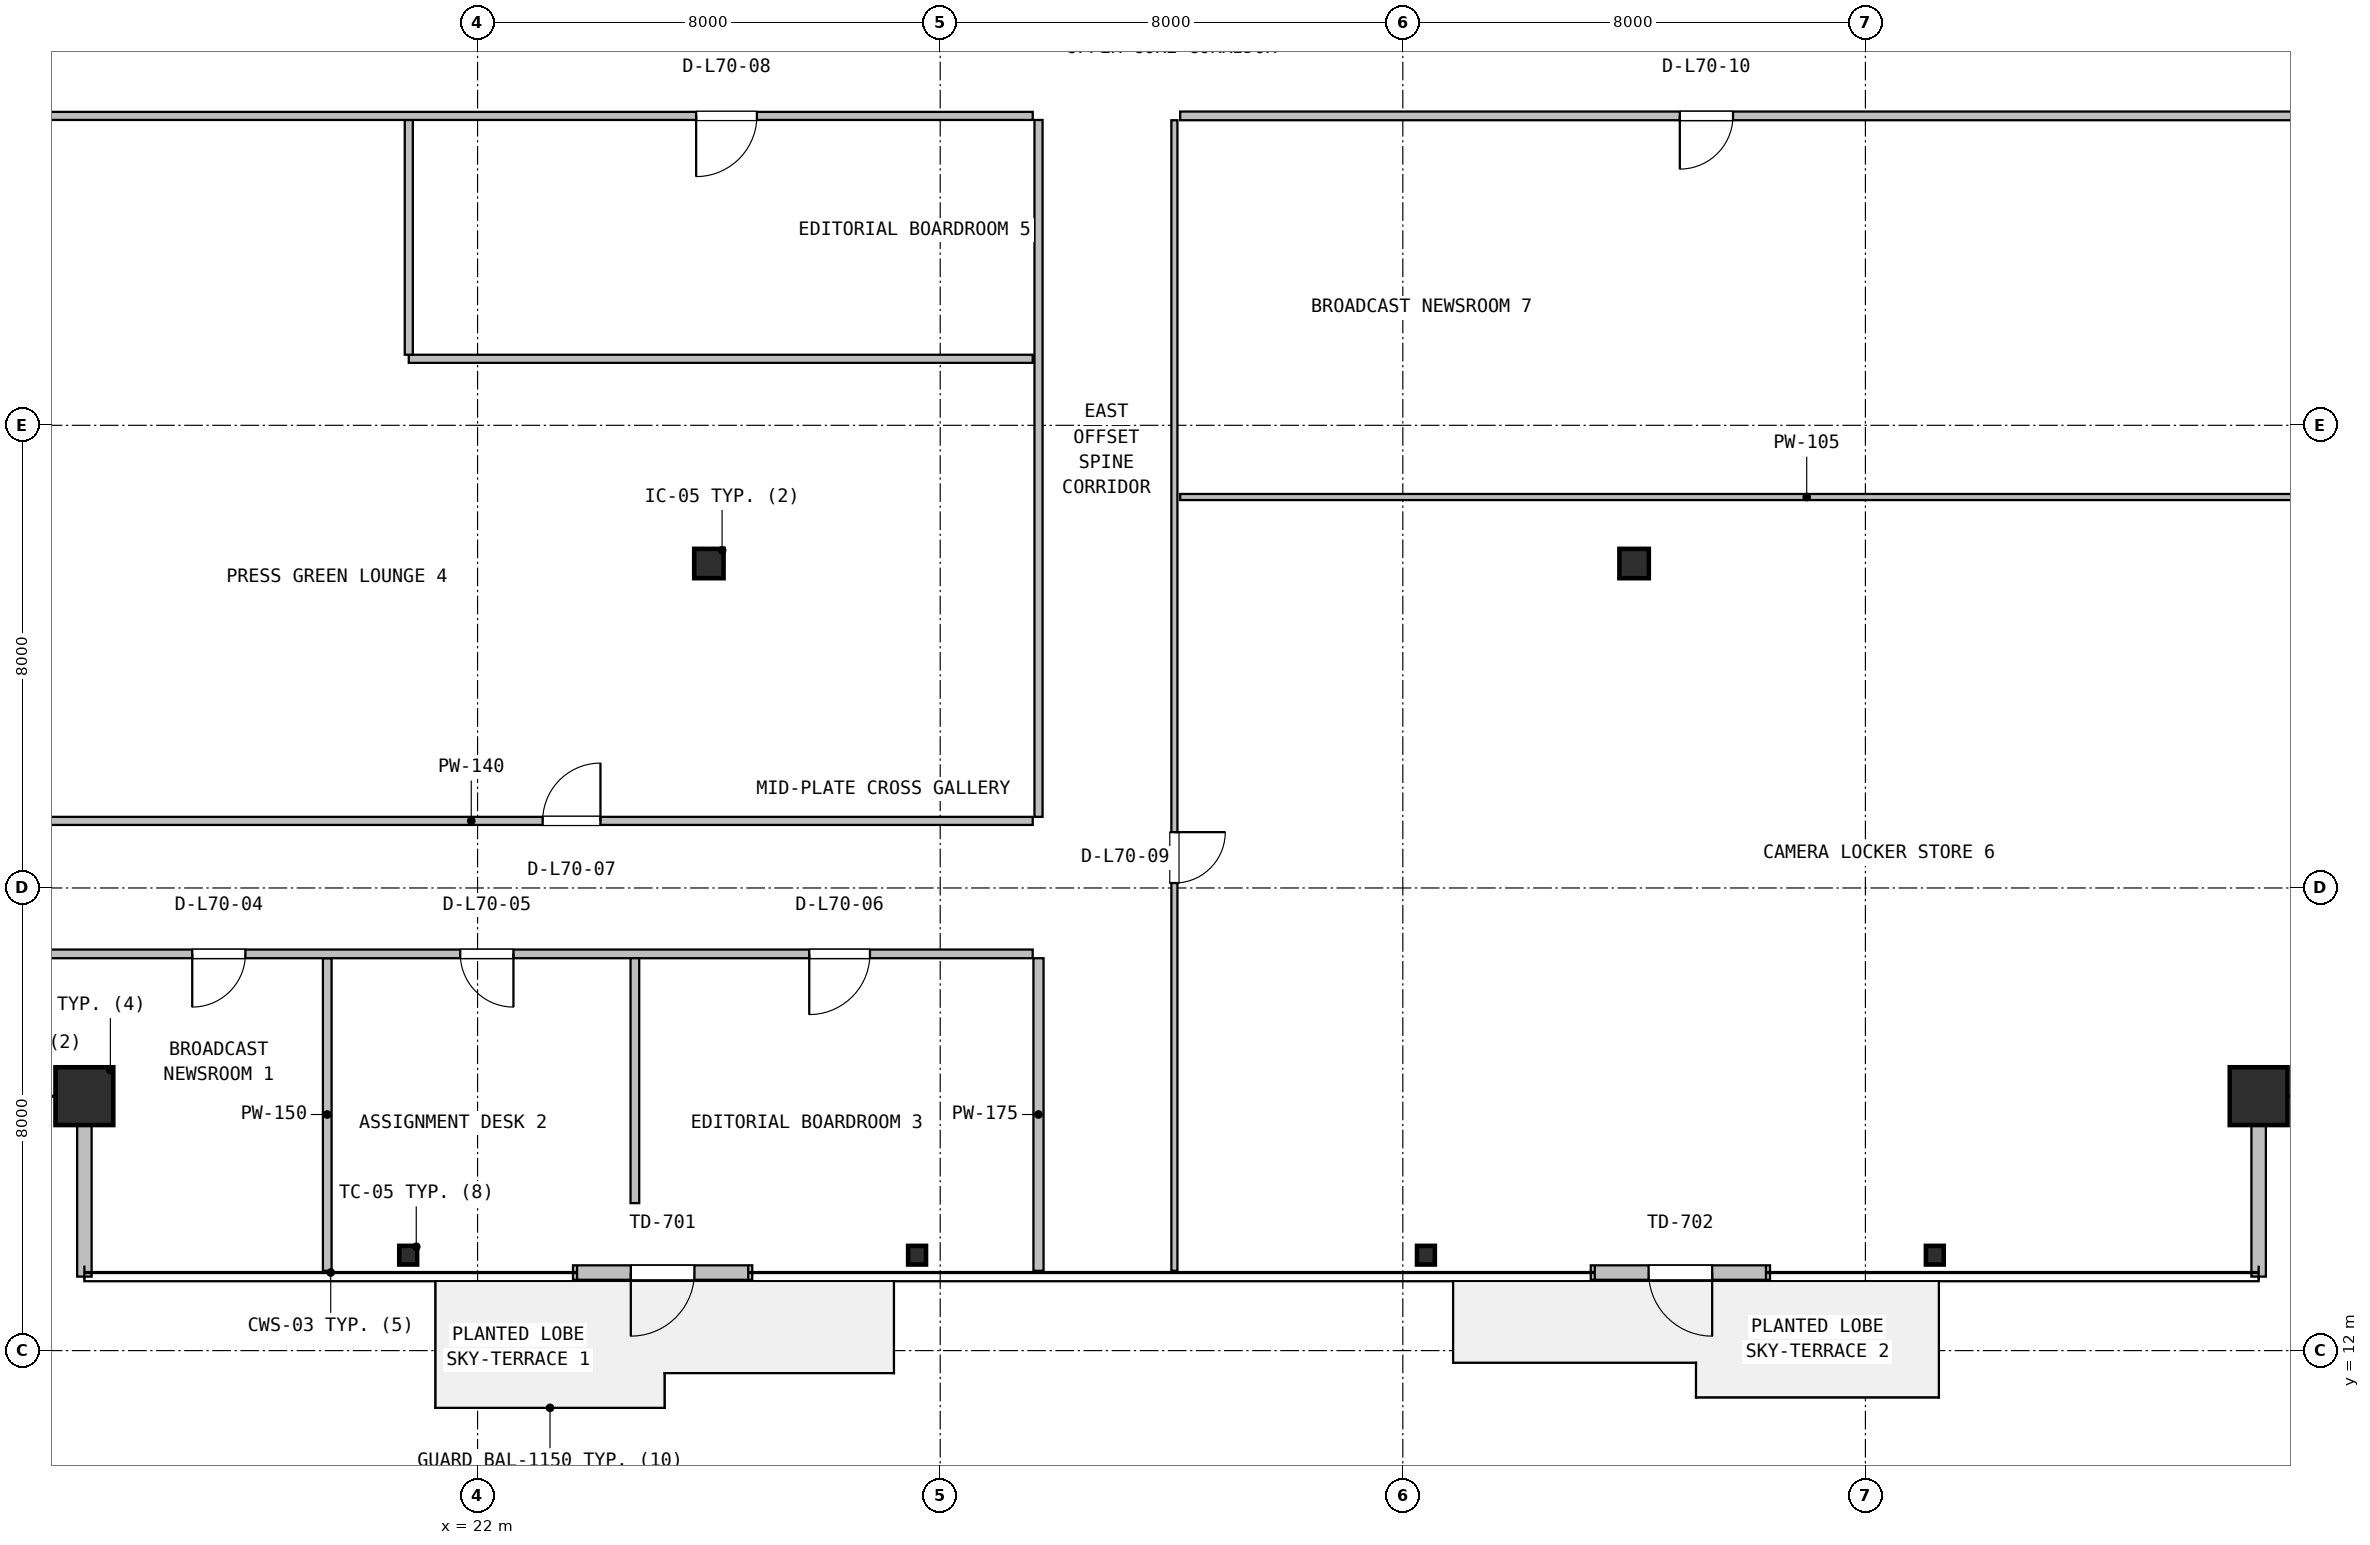
"""IFC4 building model, lengths in metres.
Left out: names, types, materials, properties, quantities, classifications, styles, units other than length and angle.
Written with IfcOpenShell. Run it as: python <this file> out.ifc"""

import sys

from ifc_helpers import new_model, si_unit, direction, frame, frame_2d, origin, origin_2d, place, context, subcontext, project, spatial, rectangle, hollow_rectangle, hollow_circle, i_section, extrude, source, transform, mapped, element, fill, save


model = new_model("IFC4")
c1 = context("Model", 3, precision=1e-05, world=origin(), true_north=direction((0.0, 1.0)))
c2 = subcontext(c1, "Body", "Model", "MODEL_VIEW")
j1 = project(units=[si_unit("LENGTHUNIT", "METRE"), si_unit("PLANEANGLEUNIT", "RADIAN")], contexts=[c1])
p1 = place(None, origin())
s1 = spatial("IfcSite", under=j1, at=p1, CompositionType="ELEMENT")
p2 = place(p1, origin())
s2 = spatial("IfcBuilding", under=s1, at=p2, CompositionType="ELEMENT")
p3 = place(p2, frame((0.0, 0.0, 281.2)))
s3 = spatial("IfcBuildingStorey", under=s2, at=p3, CompositionType="ELEMENT", Elevation=281.2)
m1 = source(origin(), c2, "Body", "SweptSolid", [
    extrude(hollow_rectangle(XDim=1.0, YDim=1.0, WallThickness=0.04, at=origin_2d()), origin(), (0.0, 0.0, 1.0), 3.8),
])
for number, where, z_axis, x_axis in (
    (1, (15.2, 16.4, 0.0), (0.0, 0.0, 1.0), (1.0, 0.0, 0.0)),
    (2, (52.8, 16.4, 0.0), (0.0, 0.0, 1.0), (1.0, 0.0, 0.0)),
):
    element("IfcColumn", number, at=place(p3, frame(where, z_axis=z_axis, x_axis=x_axis)), inside=s3, PredefinedType="COLUMN", context=c2, shape_type="MappedRepresentation", body=[
        mapped(m1, transform((0.0, 0.0, 0.0), x_axis=(1.0, 0.0, 0.0), y_axis=(0.0, 1.0, 0.0), z_axis=(0.0, 0.0, 1.0), scale=1.0)),
    ])
m2 = source(origin(), c2, "Body", "SweptSolid", [
    extrude(i_section(OverallWidth=0.309, OverallDepth=0.323, WebThickness=0.014, FlangeThickness=0.023, FilletRadius=0.015, at=origin_2d()), origin(), (0.0, 0.0, 1.0), 3.8),
])
for number, where, z_axis, x_axis in (
    (3, (20.8, 13.65, 0.0), (0.0, 0.0, 1.0), (1.0, 0.0, 0.0)),
    (4, (29.6, 13.65, 0.0), (0.0, 0.0, 1.0), (1.0, 0.0, 0.0)),
    (5, (38.4, 13.65, 0.0), (0.0, 0.0, 1.0), (1.0, 0.0, 0.0)),
    (6, (47.2, 13.65, 0.0), (0.0, 0.0, 1.0), (1.0, 0.0, 0.0)),
):
    element("IfcColumn", number, at=place(p3, frame(where, z_axis=z_axis, x_axis=x_axis)), inside=s3, PredefinedType="COLUMN", context=c2, shape_type="MappedRepresentation", body=[
        mapped(m2, transform((0.0, 0.0, 0.0), x_axis=(1.0, 0.0, 0.0), y_axis=(0.0, 1.0, 0.0), z_axis=(0.0, 0.0, 1.0), scale=1.0)),
    ])
m3 = source(origin(), c2, "Body", "SweptSolid", [
    extrude(hollow_circle(Radius=0.254, WallThickness=0.02, at=origin_2d()), origin(), (0.0, 0.0, 1.0), 3.8),
])
for number, where, z_axis, x_axis in (
    (7, (26.0, 25.61, 0.0), (0.0, 0.0, 1.0), (1.0, 0.0, 0.0)),
    (8, (42.0, 25.61, 0.0), (0.0, 0.0, 1.0), (1.0, 0.0, 0.0)),
):
    element("IfcColumn", number, at=place(p3, frame(where, z_axis=z_axis, x_axis=x_axis)), inside=s3, PredefinedType="COLUMN", context=c2, shape_type="MappedRepresentation", body=[
        mapped(m3, transform((0.0, 0.0, 0.0), x_axis=(1.0, 0.0, 0.0), y_axis=(0.0, 1.0, 0.0), z_axis=(0.0, 0.0, 1.0), scale=1.0)),
    ])
p4 = place(p3, frame((23.65, 13.35, 0.0), z_axis=(0.0, 0.0, 1.0), x_axis=(1.0, 0.0, 0.0)))
e9 = element("IfcWall", 9, at=p4, inside=s3, PredefinedType="SOLIDWALL", context=c2, shape_type="SweptSolid", body=[
    extrude(rectangle(XDim=3.1, YDim=0.25, at=frame_2d((1.55, 0.0))), origin(), (0.0, 0.0, 1.0), 3.53),
])
p5 = place(p4, frame((1.0, 0.0, 0.0)))
e10 = element("IfcOpeningElement", 10, at=p5, cuts=e9, PredefinedType="OPENING", context=c2, shape_type="SweptSolid", body=[
    extrude(rectangle(XDim=1.1, YDim=2.15, at=frame_2d((0.55, 1.075))), frame((0.0, 0.135, 0.0), z_axis=(0.0, -1.0, 0.0), x_axis=(1.0, 0.0, 0.0)), (0.0, 0.0, 1.0), 0.27),
])
p6 = place(p3, frame((41.25, 13.35, 0.0), z_axis=(0.0, 0.0, 1.0), x_axis=(1.0, 0.0, 0.0)))
e11 = element("IfcWall", 11, at=p6, inside=s3, PredefinedType="SOLIDWALL", context=c2, shape_type="SweptSolid", body=[
    extrude(rectangle(XDim=3.1, YDim=0.25, at=frame_2d((1.55, 0.0))), origin(), (0.0, 0.0, 1.0), 3.53),
])
p7 = place(p6, frame((1.0, 0.0, 0.0)))
e12 = element("IfcOpeningElement", 12, at=p7, cuts=e11, PredefinedType="OPENING", context=c2, shape_type="SweptSolid", body=[
    extrude(rectangle(XDim=1.1, YDim=2.15, at=frame_2d((0.55, 1.075))), frame((0.0, 0.135, 0.0), z_axis=(0.0, -1.0, 0.0), x_axis=(1.0, 0.0, 0.0)), (0.0, 0.0, 1.0), 0.27),
])
for number, where, z_axis, x_axis in (
    (13, (15.2, 13.28, 0.0), (0.0, 0.0, 1.0), (0.0, 1.0, 0.0)),
    (14, (52.8, 13.28, 0.0), (0.0, 0.0, 1.0), (0.0, 1.0, 0.0)),
):
    element("IfcWall", number, at=place(p3, frame(where, z_axis=z_axis, x_axis=x_axis)), inside=s3, PredefinedType="SOLIDWALL", context=c2, shape_type="SweptSolid", body=[
        extrude(rectangle(XDim=3.2, YDim=0.25, at=frame_2d((1.6, 0.0))), origin(), (0.0, 0.0, 1.0), 3.171),
    ])
p8 = place(p3, frame((19.4, 13.38, 0.0), z_axis=(0.0, 0.0, 1.0), x_axis=(0.0, 1.0, 0.0)))
e15 = element("IfcWall", 15, at=p8, inside=s3, PredefinedType="PARTITIONING", context=c2, shape_type="SweptSolid", body=[
    extrude(rectangle(XDim=5.405, YDim=0.15, at=frame_2d((2.703, 0.0))), origin(), (0.0, 0.0, 1.0), 3.171),
])
p9 = place(p3, frame((12.18, 18.86, 0.0), z_axis=(0.0, 0.0, 1.0), x_axis=(1.0, 0.0, 0.0)))
e16 = element("IfcWall", 16, at=p9, inside=s3, PredefinedType="PARTITIONING", context=c2, shape_type="SweptSolid", body=[
    extrude(rectangle(XDim=19.42, YDim=0.15, at=frame_2d((9.71, 0.0))), origin(), (0.0, 0.0, 1.0), 2.981),
])
p10 = place(p9, frame((4.885, 0.0, 0.0)))
e17 = element("IfcOpeningElement", 17, at=p10, cuts=e16, PredefinedType="OPENING", context=c2, shape_type="SweptSolid", body=[
    extrude(rectangle(XDim=0.92, YDim=2.08, at=frame_2d((0.46, 1.04))), frame((0.0, 0.085, 0.0), z_axis=(0.0, -1.0, 0.0), x_axis=(1.0, 0.0, 0.0)), (0.0, 0.0, 1.0), 0.17),
])
p11 = place(p9, frame((9.52, 0.0, 0.0)))
e18 = element("IfcOpeningElement", 18, at=p11, cuts=e16, PredefinedType="OPENING", context=c2, shape_type="SweptSolid", body=[
    extrude(rectangle(XDim=0.92, YDim=2.08, at=frame_2d((0.46, 1.04))), frame((0.0, 0.085, 0.0), z_axis=(0.0, -1.0, 0.0), x_axis=(1.0, 0.0, 0.0)), (0.0, 0.0, 1.0), 0.17),
])
p12 = place(p9, frame((15.555, 0.0, 0.0)))
e19 = element("IfcOpeningElement", 19, at=p12, cuts=e16, PredefinedType="OPENING", context=c2, shape_type="SweptSolid", body=[
    extrude(rectangle(XDim=1.05, YDim=2.1, at=frame_2d((0.525, 1.05))), frame((0.0, 0.085, 0.0), z_axis=(0.0, -1.0, 0.0), x_axis=(1.0, 0.0, 0.0)), (0.0, 0.0, 1.0), 0.17),
])
p13 = place(p3, frame((24.72, 14.55, 0.0), z_axis=(0.0, 0.0, 1.0), x_axis=(0.0, 1.0, 0.0)))
e20 = element("IfcWall", 20, at=p13, inside=s3, PredefinedType="PARTITIONING", context=c2, shape_type="SweptSolid", body=[
    extrude(rectangle(XDim=4.235, YDim=0.15, at=frame_2d((2.117, 0.0))), origin(), (0.0, 0.0, 1.0), 3.278),
])
p14 = place(p3, frame((31.7, 13.38, 0.0), z_axis=(0.0, 0.0, 1.0), x_axis=(0.0, 1.0, 0.0)))
e21 = element("IfcWall", 21, at=p14, inside=s3, PredefinedType="PARTITIONING", context=c2, shape_type="SweptSolid", body=[
    extrude(rectangle(XDim=5.405, YDim=0.175, at=frame_2d((2.703, 0.0))), origin(), (0.0, 0.0, 1.0), 3.171),
])
p15 = place(p3, frame((12.18, 21.16, 0.0), z_axis=(0.0, 0.0, 1.0), x_axis=(1.0, 0.0, 0.0)))
e22 = element("IfcWall", 22, at=p15, inside=s3, PredefinedType="PARTITIONING", context=c2, shape_type="SweptSolid", body=[
    extrude(rectangle(XDim=19.42, YDim=0.14, at=frame_2d((9.71, 0.0))), origin(), (0.0, 0.0, 1.0), 2.981),
])
p16 = place(p15, frame((10.945, 0.0, 0.0)))
e23 = element("IfcOpeningElement", 23, at=p16, cuts=e22, PredefinedType="OPENING", context=c2, shape_type="SweptSolid", body=[
    extrude(rectangle(XDim=1.0, YDim=2.1, at=frame_2d((0.5, 1.05))), frame((0.0, 0.08, 0.0), z_axis=(0.0, -1.0, 0.0), x_axis=(1.0, 0.0, 0.0)), (0.0, 0.0, 1.0), 0.16),
])
p17 = place(p3, frame((31.7, 21.23, 0.0), z_axis=(0.0, 0.0, 1.0), x_axis=(0.0, 1.0, 0.0)))
e24 = element("IfcWall", 24, at=p17, inside=s3, PredefinedType="PARTITIONING", context=c2, shape_type="SweptSolid", body=[
    extrude(rectangle(XDim=12.05, YDim=0.14, at=frame_2d((6.025, 0.0))), origin(), (0.0, 0.0, 1.0), 2.981),
])
p18 = place(p3, frame((20.81, 29.15, 0.0), z_axis=(0.0, 0.0, 1.0), x_axis=(1.0, 0.0, 0.0)))
e25 = element("IfcWall", 25, at=p18, inside=s3, PredefinedType="PARTITIONING", context=c2, shape_type="SweptSolid", body=[
    extrude(rectangle(XDim=10.79, YDim=0.14, at=frame_2d((5.395, 0.0))), origin(), (0.0, 0.0, 1.0), 2.981),
])
p19 = place(p3, frame((20.81, 29.22, 0.0), z_axis=(0.0, 0.0, 1.0), x_axis=(0.0, 1.0, 0.0)))
e26 = element("IfcWall", 26, at=p19, inside=s3, PredefinedType="PARTITIONING", context=c2, shape_type="SweptSolid", body=[
    extrude(rectangle(XDim=4.06, YDim=0.14, at=frame_2d((2.03, 0.0))), origin(), (0.0, 0.0, 1.0), 3.53),
])
p20 = place(p3, frame((12.18, 33.35, 0.0), z_axis=(0.0, 0.0, 1.0), x_axis=(1.0, 0.0, 0.0)))
e27 = element("IfcWall", 27, at=p20, inside=s3, PredefinedType="PARTITIONING", context=c2, shape_type="SweptSolid", body=[
    extrude(rectangle(XDim=19.42, YDim=0.14, at=frame_2d((9.71, 0.0))), origin(), (0.0, 0.0, 1.0), 2.981),
])
p21 = place(p20, frame((13.6, 0.0, 0.0)))
e28 = element("IfcOpeningElement", 28, at=p21, cuts=e27, PredefinedType="OPENING", context=c2, shape_type="SweptSolid", body=[
    extrude(rectangle(XDim=1.05, YDim=2.1, at=frame_2d((0.525, 1.05))), frame((0.0, 0.08, 0.0), z_axis=(0.0, -1.0, 0.0), x_axis=(1.0, 0.0, 0.0)), (0.0, 0.0, 1.0), 0.16),
])
p22 = place(p3, frame((34.15, 26.76, 0.0), z_axis=(0.0, 0.0, 1.0), x_axis=(1.0, 0.0, 0.0)))
e29 = element("IfcWall", 29, at=p22, inside=s3, PredefinedType="PARTITIONING", context=c2, shape_type="SweptSolid", body=[
    extrude(rectangle(XDim=21.67, YDim=0.105, at=frame_2d((10.835, 0.0))), origin(), (0.0, 0.0, 1.0), 2.981),
])
p23 = place(p3, frame((34.05, 13.38, 0.0), z_axis=(0.0, 0.0, 1.0), x_axis=(0.0, 1.0, 0.0)))
e30 = element("IfcWall", 30, at=p23, inside=s3, PredefinedType="PARTITIONING", context=c2, shape_type="SweptSolid", body=[
    extrude(rectangle(XDim=19.895, YDim=0.105, at=frame_2d((9.948, 0.0))), origin(), (0.0, 0.0, 1.0), 2.981),
])
p24 = place(p23, frame((6.705, 0.0, 0.0)))
e31 = element("IfcOpeningElement", 31, at=p24, cuts=e30, PredefinedType="OPENING", context=c2, shape_type="SweptSolid", body=[
    extrude(rectangle(XDim=0.88, YDim=2.06, at=frame_2d((0.44, 1.03))), frame((0.0, 0.062, 0.0), z_axis=(0.0, -1.0, 0.0), x_axis=(1.0, 0.0, 0.0)), (0.0, 0.0, 1.0), 0.125),
])
p25 = place(p3, frame((34.15, 33.35, 0.0), z_axis=(0.0, 0.0, 1.0), x_axis=(1.0, 0.0, 0.0)))
e32 = element("IfcWall", 32, at=p25, inside=s3, PredefinedType="PARTITIONING", context=c2, shape_type="SweptSolid", body=[
    extrude(rectangle(XDim=21.67, YDim=0.15, at=frame_2d((10.835, 0.0))), origin(), (0.0, 0.0, 1.0), 2.981),
])
p26 = place(p25, frame((8.64, 0.0, 0.0)))
e33 = element("IfcOpeningElement", 33, at=p26, cuts=e32, PredefinedType="OPENING", context=c2, shape_type="SweptSolid", body=[
    extrude(rectangle(XDim=0.92, YDim=2.08, at=frame_2d((0.46, 1.04))), frame((0.0, 0.085, 0.0), z_axis=(0.0, -1.0, 0.0), x_axis=(1.0, 0.0, 0.0)), (0.0, 0.0, 1.0), 0.17),
])
m4 = source(origin(), c2, "Body", "SweptSolid", [
    extrude(rectangle(XDim=1.1, YDim=2.15, at=frame_2d((0.55, 1.075))), frame((0.0, 0.025, 0.0), z_axis=(0.0, -1.0, 0.0), x_axis=(1.0, 0.0, 0.0)), (0.0, 0.0, 1.0), 0.05),
])
p27 = place(p5, frame((1.1, 0.0, 0.0), z_axis=(0.0, 0.0, 1.0), x_axis=(-1.0, 0.0, 0.0)))
e34 = element("IfcDoor", 34, at=p27, inside=s3, OperationType="SINGLE_SWING_LEFT", PredefinedType="DOOR", context=c2, shape_type="MappedRepresentation", body=[
    mapped(m4, transform((0.0, 0.0, 0.0), x_axis=(1.0, 0.0, 0.0), y_axis=(0.0, 1.0, 0.0), z_axis=(0.0, 0.0, 1.0), scale=1.0)),
])
fill(e10, e34)
p28 = place(p7, frame((1.1, 0.0, 0.0), z_axis=(0.0, 0.0, 1.0), x_axis=(-1.0, 0.0, 0.0)))
e35 = element("IfcDoor", 35, at=p28, inside=s3, OperationType="SINGLE_SWING_RIGHT", PredefinedType="DOOR", context=c2, shape_type="MappedRepresentation", body=[
    mapped(m4, transform((0.0, 0.0, 0.0), x_axis=(1.0, 0.0, 0.0), y_axis=(0.0, 1.0, 0.0), z_axis=(0.0, 0.0, 1.0), scale=1.0)),
])
fill(e12, e35)
m5 = source(origin(), c2, "Body", "SweptSolid", [
    extrude(rectangle(XDim=0.92, YDim=2.08, at=frame_2d((0.46, 1.04))), frame((0.0, 0.025, 0.0), z_axis=(0.0, -1.0, 0.0), x_axis=(1.0, 0.0, 0.0)), (0.0, 0.0, 1.0), 0.05),
])
p29 = place(p10, frame((0.92, 0.0, 0.0), z_axis=(0.0, 0.0, 1.0), x_axis=(-1.0, 0.0, 0.0)))
e36 = element("IfcDoor", 36, at=p29, inside=s3, OperationType="SINGLE_SWING_LEFT", PredefinedType="DOOR", context=c2, shape_type="MappedRepresentation", body=[
    mapped(m5, transform((0.0, 0.0, 0.0), x_axis=(1.0, 0.0, 0.0), y_axis=(0.0, 1.0, 0.0), z_axis=(0.0, 0.0, 1.0), scale=1.0)),
])
fill(e17, e36)
p30 = place(p11, frame((0.92, 0.0, 0.0), z_axis=(0.0, 0.0, 1.0), x_axis=(-1.0, 0.0, 0.0)))
e37 = element("IfcDoor", 37, at=p30, inside=s3, OperationType="SINGLE_SWING_RIGHT", PredefinedType="DOOR", context=c2, shape_type="MappedRepresentation", body=[
    mapped(m5, transform((0.0, 0.0, 0.0), x_axis=(1.0, 0.0, 0.0), y_axis=(0.0, 1.0, 0.0), z_axis=(0.0, 0.0, 1.0), scale=1.0)),
])
fill(e18, e37)
m6 = source(origin(), c2, "Body", "SweptSolid", [
    extrude(rectangle(XDim=1.05, YDim=2.1, at=frame_2d((0.525, 1.05))), frame((0.0, 0.025, 0.0), z_axis=(0.0, -1.0, 0.0), x_axis=(1.0, 0.0, 0.0)), (0.0, 0.0, 1.0), 0.05),
])
p31 = place(p12, frame((1.05, 0.0, 0.0), z_axis=(0.0, 0.0, 1.0), x_axis=(-1.0, 0.0, 0.0)))
e38 = element("IfcDoor", 38, at=p31, inside=s3, OperationType="SINGLE_SWING_LEFT", PredefinedType="DOOR", context=c2, shape_type="MappedRepresentation", body=[
    mapped(m6, transform((0.0, 0.0, 0.0), x_axis=(1.0, 0.0, 0.0), y_axis=(0.0, 1.0, 0.0), z_axis=(0.0, 0.0, 1.0), scale=1.0)),
])
fill(e19, e38)
m7 = source(origin(), c2, "Body", "SweptSolid", [
    extrude(rectangle(XDim=1.0, YDim=2.1, at=frame_2d((0.5, 1.05))), frame((0.0, 0.025, 0.0), z_axis=(0.0, -1.0, 0.0), x_axis=(1.0, 0.0, 0.0)), (0.0, 0.0, 1.0), 0.05),
])
p32 = place(p16, origin())
e39 = element("IfcDoor", 39, at=p32, inside=s3, OperationType="SINGLE_SWING_RIGHT", PredefinedType="DOOR", context=c2, shape_type="MappedRepresentation", body=[
    mapped(m7, transform((0.0, 0.0, 0.0), x_axis=(1.0, 0.0, 0.0), y_axis=(0.0, 1.0, 0.0), z_axis=(0.0, 0.0, 1.0), scale=1.0)),
])
fill(e23, e39)
p33 = place(p21, frame((1.05, 0.0, 0.0), z_axis=(0.0, 0.0, 1.0), x_axis=(-1.0, 0.0, 0.0)))
e40 = element("IfcDoor", 40, at=p33, inside=s3, OperationType="SINGLE_SWING_LEFT", PredefinedType="DOOR", context=c2, shape_type="MappedRepresentation", body=[
    mapped(m6, transform((0.0, 0.0, 0.0), x_axis=(1.0, 0.0, 0.0), y_axis=(0.0, 1.0, 0.0), z_axis=(0.0, 0.0, 1.0), scale=1.0)),
])
fill(e28, e40)
m8 = source(origin(), c2, "Body", "SweptSolid", [
    extrude(rectangle(XDim=0.88, YDim=2.06, at=frame_2d((0.44, 1.03))), frame((0.0, 0.025, 0.0), z_axis=(0.0, -1.0, 0.0), x_axis=(1.0, 0.0, 0.0)), (0.0, 0.0, 1.0), 0.05),
])
p34 = place(p24, frame((0.88, 0.0, 0.0), z_axis=(0.0, 0.0, 1.0), x_axis=(-1.0, 0.0, 0.0)))
e41 = element("IfcDoor", 41, at=p34, inside=s3, OperationType="SINGLE_SWING_RIGHT", PredefinedType="DOOR", context=c2, shape_type="MappedRepresentation", body=[
    mapped(m8, transform((0.0, 0.0, 0.0), x_axis=(1.0, 0.0, 0.0), y_axis=(0.0, 1.0, 0.0), z_axis=(0.0, 0.0, 1.0), scale=1.0)),
])
fill(e31, e41)
p35 = place(p26, frame((0.92, 0.0, 0.0), z_axis=(0.0, 0.0, 1.0), x_axis=(-1.0, 0.0, 0.0)))
e42 = element("IfcDoor", 42, at=p35, inside=s3, OperationType="SINGLE_SWING_LEFT", PredefinedType="DOOR", context=c2, shape_type="MappedRepresentation", body=[
    mapped(m5, transform((0.0, 0.0, 0.0), x_axis=(1.0, 0.0, 0.0), y_axis=(0.0, 1.0, 0.0), z_axis=(0.0, 0.0, 1.0), scale=1.0)),
])
fill(e33, e42)
save(model, sys.argv[1])
